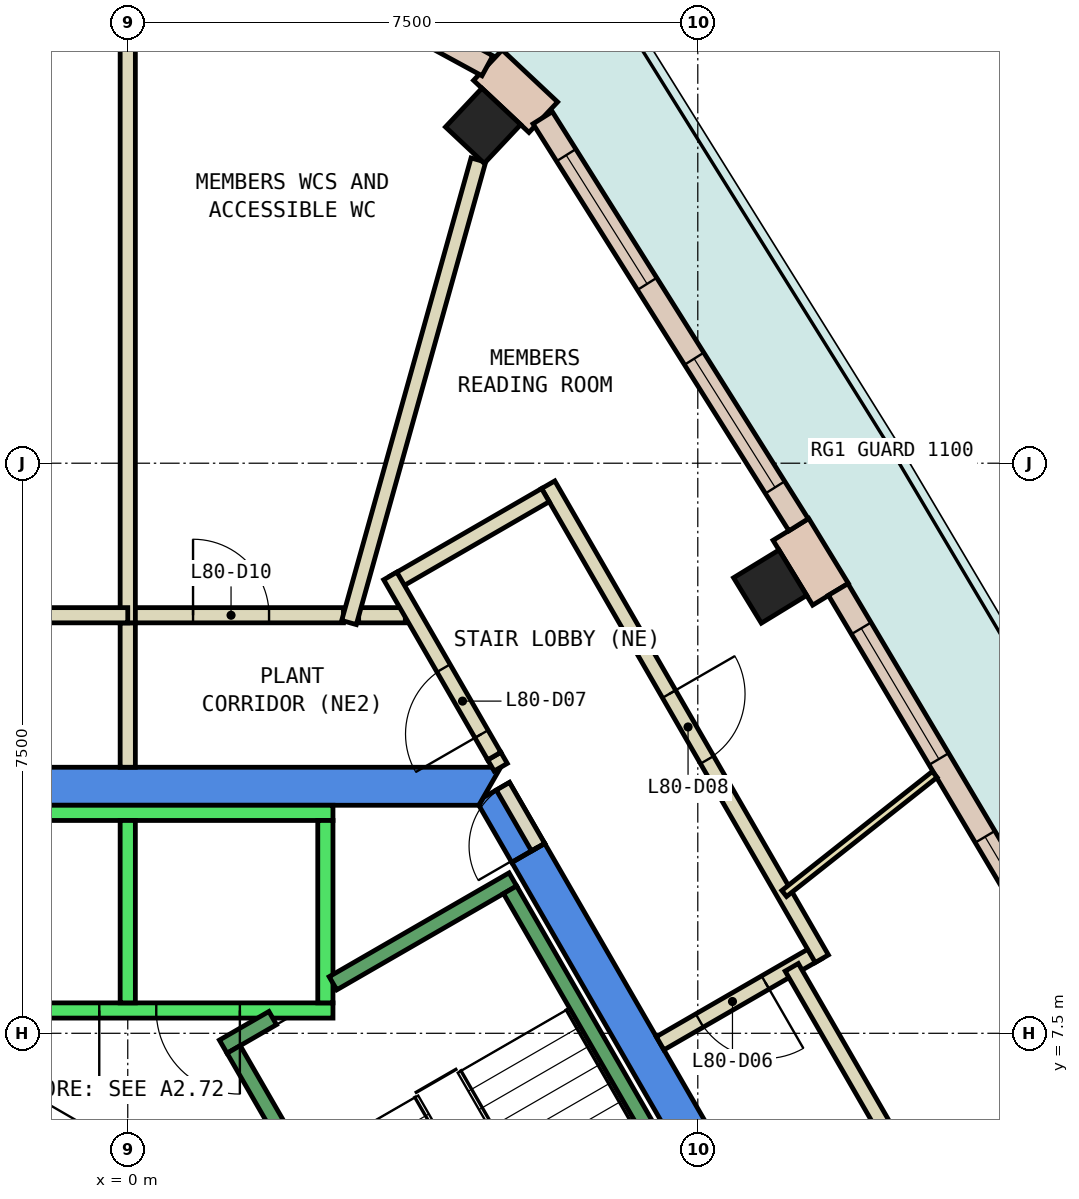
"""IFC4 building model, lengths in metres.
Left out: names, types, materials, properties, quantities, classifications, styles, units other than length and angle.
Written with IfcOpenShell. Run it as: python <this file> out.ifc"""

import sys

from ifc_helpers import new_model, si_unit, direction, frame, frame_2d, origin, origin_2d, place, context, subcontext, project, spatial, polyline, rectangle, outline, extrude, element, fill, save


model = new_model("IFC4")
c1 = context("Model", 3, precision=1e-05, world=origin(), true_north=direction((0.0, 1.0)))
c2 = subcontext(c1, "Body", "Model", "MODEL_VIEW")
j1 = project(units=[si_unit("LENGTHUNIT", "METRE"), si_unit("PLANEANGLEUNIT", "RADIAN")], contexts=[c1])
p1 = place(None, origin())
s1 = spatial("IfcSite", under=j1, at=p1, CompositionType="ELEMENT")
p2 = place(p1, origin())
s2 = spatial("IfcBuilding", under=s1, at=p2, CompositionType="ELEMENT")
p3 = place(p2, frame((0.0, 0.0, 340.4)))
s3 = spatial("IfcBuildingStorey", under=s2, at=p3, CompositionType="ELEMENT", Elevation=340.4)
for number, where, z_axis, x_axis in (
    (1, (8.452, 13.377, 0.0), (0.0, 0.0, 1.0), (-0.522, 0.853, 0.0)),
    (2, (4.675, 19.439, 0.0), (0.0, 0.0, 1.0), (-0.729, 0.685, 0.0)),
):
    element("IfcColumn", number, at=place(p3, frame(where, z_axis=z_axis, x_axis=x_axis)), inside=s3, PredefinedType="COLUMN", context=c2, shape_type="SweptSolid", body=[
        extrude(rectangle(XDim=0.7, YDim=0.7, at=origin_2d()), origin(), (0.0, 0.0, 1.0), 4.15),
    ])
p4 = place(p3, frame((0.0, 0.0, -0.45)))
e3 = element("IfcWall", 3, at=p4, inside=s3, PredefinedType="SHEAR", context=c2, shape_type="SweptSolid", body=[
    extrude(outline(polyline([(5.486, 9.998), (5.053, 9.748), (9.238, 2.5), (9.815, 2.5), (5.486, 9.998)])), origin(), (0.0, 0.0, 1.0), 4.6),
])
p5 = place(p3, frame((0.0, 0.0, 3.6)))
e4 = element("IfcWall", 4, at=p5, inside=s3, PredefinedType="SHEAR", context=c2, shape_type="SweptSolid", body=[
    extrude(outline(polyline([(5.022, 10.8), (4.677, 10.601), (4.619, 10.5), (5.053, 9.748), (5.486, 9.998), (5.022, 10.8)])), origin(), (0.0, 0.0, 1.0), 0.55),
])
p6 = place(p3, frame((0.0, 0.0, -0.45)))
e5 = element("IfcWall", 5, at=p6, inside=s3, PredefinedType="SHEAR", context=c2, shape_type="SweptSolid", body=[
    extrude(outline(polyline([(4.907, 11.0), (-4.907, 11.0), (-4.619, 10.5), (4.619, 10.5), (4.907, 11.0)])), origin(), (0.0, 0.0, 1.0), 4.6),
])
p7 = place(p3, frame((9.246, 13.276, 0.0), z_axis=(0.0, 0.0, 1.0), x_axis=(-0.521232636172, 0.853414634857, 0.0)))
e6 = element("IfcWall", 6, at=p7, inside=s3, PredefinedType="STANDARD", context=c2, shape_type="SweptSolid", body=[
    extrude(rectangle(XDim=1.0, YDim=0.55, at=frame_2d((0.5, 0.0))), origin(), (0.0, 0.0, 1.0), 4.15),
])
p8 = place(p3, frame((5.467, 19.552, 0.0), z_axis=(0.0, 0.0, 1.0), x_axis=(-0.728729965402, 0.684801166416, 0.0)))
e7 = element("IfcWall", 7, at=p8, inside=s3, PredefinedType="STANDARD", context=c2, shape_type="SweptSolid", body=[
    extrude(rectangle(XDim=1.0, YDim=0.55, at=frame_2d((0.5, 0.0))), origin(), (0.0, 0.0, 1.0), 4.15),
])
p9 = place(p3, frame((12.605, 7.854, 0.0), z_axis=(0.0, 0.0, 1.0), x_axis=(-0.510686403068, 0.859767060152, 0.0)))
e8 = element("IfcWall", 8, at=p9, inside=s3, PredefinedType="STANDARD", context=c2, shape_type="SweptSolid", body=[
    extrude(rectangle(XDim=6.38, YDim=0.3, at=frame_2d((3.19, 0.0))), origin(), (0.0, 0.0, 1.0), 4.15),
])
p10 = place(p9, frame((0.595, 0.0, 0.9)))
e9 = element("IfcOpeningElement", 9, at=p10, cuts=e8, PredefinedType="OPENING", context=c2, shape_type="SweptSolid", body=[
    extrude(rectangle(XDim=2.0, YDim=3.0, at=frame_2d((1.0, 1.5))), frame((0.0, 0.16, 0.0), z_axis=(0.0, -1.0, 0.0), x_axis=(1.0, 0.0, 0.0)), (0.0, 0.0, 1.0), 0.32),
])
p11 = place(p9, frame((3.785, 0.0, 0.9)))
e10 = element("IfcOpeningElement", 10, at=p11, cuts=e8, PredefinedType="OPENING", context=c2, shape_type="SweptSolid", body=[
    extrude(rectangle(XDim=2.0, YDim=3.0, at=frame_2d((1.0, 1.5))), frame((0.0, 0.16, 0.0), z_axis=(0.0, -1.0, 0.0), x_axis=(1.0, 0.0, 0.0)), (0.0, 0.0, 1.0), 0.32),
])
p12 = place(p3, frame((8.826, 14.19, 0.0), z_axis=(0.0, 0.0, 1.0), x_axis=(-0.532279831475, 0.846568473902, 0.0)))
e11 = element("IfcWall", 11, at=p12, inside=s3, PredefinedType="STANDARD", context=c2, shape_type="SweptSolid", body=[
    extrude(rectangle(XDim=6.325, YDim=0.3, at=frame_2d((3.163, 0.0))), origin(), (0.0, 0.0, 1.0), 4.15),
])
p13 = place(p12, frame((0.581, 0.0, 0.9)))
e12 = element("IfcOpeningElement", 12, at=p13, cuts=e11, PredefinedType="OPENING", context=c2, shape_type="SweptSolid", body=[
    extrude(rectangle(XDim=2.0, YDim=3.0, at=frame_2d((1.0, 1.5))), frame((0.0, 0.16, 0.0), z_axis=(0.0, -1.0, 0.0), x_axis=(1.0, 0.0, 0.0)), (0.0, 0.0, 1.0), 0.32),
])
p14 = place(p12, frame((3.744, 0.0, 0.9)))
e13 = element("IfcOpeningElement", 13, at=p14, cuts=e11, PredefinedType="OPENING", context=c2, shape_type="SweptSolid", body=[
    extrude(rectangle(XDim=2.0, YDim=3.0, at=frame_2d((1.0, 1.5))), frame((0.0, 0.16, 0.0), z_axis=(0.0, -1.0, 0.0), x_axis=(1.0, 0.0, 0.0)), (0.0, 0.0, 1.0), 0.32),
])
p15 = place(p3, frame((4.732, 20.229, 0.0), z_axis=(0.0, 0.0, 1.0), x_axis=(-0.8782630237, 0.478177855197, 0.0)))
e14 = element("IfcWall", 14, at=p15, inside=s3, PredefinedType="STANDARD", context=c2, shape_type="SweptSolid", body=[
    extrude(rectangle(XDim=4.364, YDim=0.3, at=frame_2d((2.182, 0.0))), origin(), (0.0, 0.0, 1.0), 4.15),
])
p16 = place(p15, frame((1.482, 0.0, 0.9)))
e15 = element("IfcOpeningElement", 15, at=p16, cuts=e14, PredefinedType="OPENING", context=c2, shape_type="SweptSolid", body=[
    extrude(rectangle(XDim=1.4, YDim=3.0, at=frame_2d((0.7, 1.5))), frame((0.0, 0.16, 0.0), z_axis=(0.0, -1.0, 0.0), x_axis=(1.0, 0.0, 0.0)), (0.0, 0.0, 1.0), 0.32),
])
p17 = place(p3, frame((-0.899, 22.316, 0.0), z_axis=(0.0, 0.0, 1.0), x_axis=(-0.8782630237, -0.478177855197, 0.0)))
e16 = element("IfcWall", 16, at=p17, inside=s3, PredefinedType="STANDARD", context=c2, shape_type="SweptSolid", body=[
    extrude(rectangle(XDim=4.364, YDim=0.3, at=frame_2d((2.182, 0.0))), origin(), (0.0, 0.0, 1.0), 4.15),
])
p18 = place(p17, frame((1.482, 0.0, 0.9)))
e17 = element("IfcOpeningElement", 17, at=p18, cuts=e16, PredefinedType="OPENING", context=c2, shape_type="SweptSolid", body=[
    extrude(rectangle(XDim=1.4, YDim=3.0, at=frame_2d((0.7, 1.5))), frame((0.0, 0.16, 0.0), z_axis=(0.0, -1.0, 0.0), x_axis=(1.0, 0.0, 0.0)), (0.0, 0.0, 1.0), 0.32),
])
p19 = place(p3, frame((9.082, 8.568, 0.0), z_axis=(0.0, 0.0, 1.0), x_axis=(-0.865955154139, -0.50012165622, 0.0)))
e18 = element("IfcWall", 18, at=p19, inside=s3, PredefinedType="PARTITIONING", context=c2, shape_type="SweptSolid", body=[
    extrude(rectangle(XDim=2.4, YDim=0.2, at=frame_2d((1.2, 0.0))), origin(), (0.0, 0.0, 1.0), 4.15),
])
p20 = place(p19, frame((0.8, 0.0, 0.0)))
e19 = element("IfcOpeningElement", 19, at=p20, cuts=e18, PredefinedType="OPENING", context=c2, shape_type="SweptSolid", body=[
    extrude(rectangle(XDim=1.0, YDim=2.1, at=frame_2d((0.5, 1.05))), frame((0.0, 0.11, 0.0), z_axis=(0.0, -1.0, 0.0), x_axis=(1.0, 0.0, 0.0)), (0.0, 0.0, 1.0), 0.22),
])
p21 = place(p3, frame((4.907, 11.0, 0.0), z_axis=(0.0, 0.0, 1.0), x_axis=(-0.5004692653, 0.865754303766, 0.0)))
e20 = element("IfcWall", 20, at=p21, inside=s3, PredefinedType="PARTITIONING", context=c2, shape_type="SweptSolid", body=[
    extrude(rectangle(XDim=0.17, YDim=0.2, at=frame_2d((0.085, 0.0))), origin(), (0.0, 0.0, 1.0), 2.4),
])
p22 = place(p3, frame((5.532, 14.717, 0.0), z_axis=(0.0, 0.0, 1.0), x_axis=(0.499968011863, -0.866043871356, 0.0)))
e21 = element("IfcWall", 21, at=p22, inside=s3, PredefinedType="PARTITIONING", context=c2, shape_type="SweptSolid", body=[
    extrude(rectangle(XDim=7.201, YDim=0.2, at=frame_2d((3.6, 0.0))), origin(), (0.0, 0.0, 1.0), 4.15),
])
p23 = place(p22, frame((3.18, 0.0, 0.0)))
e22 = element("IfcOpeningElement", 22, at=p23, cuts=e21, PredefinedType="OPENING", context=c2, shape_type="SweptSolid", body=[
    extrude(rectangle(XDim=1.0, YDim=2.1, at=frame_2d((0.5, 1.05))), frame((0.0, 0.11, 0.0), z_axis=(0.0, -1.0, 0.0), x_axis=(1.0, 0.0, 0.0)), (0.0, 0.0, 1.0), 0.22),
])
p24 = place(p3, frame((3.504, 13.43, 0.0), z_axis=(0.0, 0.0, 1.0), x_axis=(0.865927408828, 0.500169693844, 0.0)))
e23 = element("IfcWall", 23, at=p24, inside=s3, PredefinedType="PARTITIONING", context=c2, shape_type="SweptSolid", body=[
    extrude(rectangle(XDim=2.3, YDim=0.2, at=frame_2d((1.15, 0.0))), origin(), (0.0, 0.0, 1.0), 4.15),
])
p25 = place(p3, frame((8.736, 8.368, 0.0), z_axis=(0.0, 0.0, 1.0), x_axis=(0.499995994493, -0.866027716353, 0.0)))
e24 = element("IfcWall", 24, at=p25, inside=s3, PredefinedType="PARTITIONING", context=c2, shape_type="SweptSolid", body=[
    extrude(rectangle(XDim=6.876, YDim=0.2, at=frame_2d((3.438, 0.0))), origin(), (0.0, 0.0, 1.0), 4.15),
])
p26 = place(p25, frame((5.726, 0.0, 0.0)))
e25 = element("IfcOpeningElement", 25, at=p26, cuts=e24, PredefinedType="OPENING", context=c2, shape_type="SweptSolid", body=[
    extrude(rectangle(XDim=1.0, YDim=2.1, at=frame_2d((0.5, 1.05))), frame((0.0, 0.11, 0.0), z_axis=(0.0, -1.0, 0.0), x_axis=(1.0, 0.0, 0.0)), (0.0, 0.0, 1.0), 0.22),
])
p27 = place(p3, frame((3.038, 13.0, 0.0), z_axis=(0.0, 0.0, 1.0), x_axis=(1.0, 0.0, 0.0)))
e26 = element("IfcWall", 26, at=p27, inside=s3, PredefinedType="PARTITIONING", context=c2, shape_type="SweptSolid", body=[
    extrude(rectangle(XDim=0.614, YDim=0.2, at=frame_2d((0.307, 0.0))), origin(), (0.0, 0.0, 1.0), 4.15),
])
p28 = place(p3, frame((0.0, 13.0, 0.0), z_axis=(0.0, 0.0, 1.0), x_axis=(1.0, 0.0, 0.0)))
e27 = element("IfcWall", 27, at=p28, inside=s3, PredefinedType="PARTITIONING", context=c2, shape_type="SweptSolid", body=[
    extrude(rectangle(XDim=2.838, YDim=0.2, at=frame_2d((1.419, 0.0))), origin(), (0.0, 0.0, 1.0), 4.15),
])
p29 = place(p28, frame((0.859, 0.0, 0.0)))
e28 = element("IfcOpeningElement", 28, at=p29, cuts=e27, PredefinedType="OPENING", context=c2, shape_type="SweptSolid", body=[
    extrude(rectangle(XDim=1.0, YDim=2.1, at=frame_2d((0.5, 1.05))), frame((0.0, 0.11, 0.0), z_axis=(0.0, -1.0, 0.0), x_axis=(1.0, 0.0, 0.0)), (0.0, 0.0, 1.0), 0.22),
])
p30 = place(p3, frame((0.0, 11.0, 0.0), z_axis=(0.0, 0.0, 1.0), x_axis=(0.0, 1.0, 0.0)))
e29 = element("IfcWall", 29, at=p30, inside=s3, PredefinedType="PARTITIONING", context=c2, shape_type="SweptSolid", body=[
    extrude(rectangle(XDim=1.9, YDim=0.2, at=frame_2d((0.95, 0.0))), origin(), (0.0, 0.0, 1.0), 4.15),
])
p31 = place(p3, frame((10.617, 10.906, 0.0), z_axis=(0.0, 0.0, 1.0), x_axis=(-0.784159528351, -0.620559291363, 0.0)))
e30 = element("IfcWall", 30, at=p31, inside=s3, PredefinedType="PARTITIONING", context=c2, shape_type="SweptSolid", body=[
    extrude(rectangle(XDim=2.525, YDim=0.1, at=frame_2d((1.262, 0.0))), origin(), (0.0, 0.0, 1.0), 4.15),
])
p32 = place(p3, frame((2.911, 12.904, 0.0), z_axis=(0.0, 0.0, 1.0), x_axis=(0.269389141698, 0.963031406723, 0.0)))
e31 = element("IfcWall", 31, at=p32, inside=s3, PredefinedType="PARTITIONING", context=c2, shape_type="SweptSolid", body=[
    extrude(rectangle(XDim=6.319, YDim=0.2, at=frame_2d((3.159, 0.0))), origin(), (0.0, 0.0, 1.0), 4.15),
])
p33 = place(p3, frame((0.0, 12.9, 0.0), z_axis=(0.0, 0.0, 1.0), x_axis=(0.0, 1.0, 0.0)))
e32 = element("IfcWall", 32, at=p33, inside=s3, PredefinedType="PARTITIONING", context=c2, shape_type="SweptSolid", body=[
    extrude(rectangle(XDim=7.756, YDim=0.2, at=frame_2d((3.878, 0.0))), origin(), (0.0, 0.0, 1.0), 4.15),
])
p34 = place(p3, frame((-5.962, 13.0, 0.0), z_axis=(0.0, 0.0, 1.0), x_axis=(1.0, 0.0, 0.0)))
e33 = element("IfcWall", 33, at=p34, inside=s3, PredefinedType="PARTITIONING", context=c2, shape_type="SweptSolid", body=[
    extrude(rectangle(XDim=5.962, YDim=0.2, at=frame_2d((2.981, 0.0))), origin(), (0.0, 0.0, 1.0), 4.15),
])
p35 = place(p3, frame((5.399, 9.948, 0.0), z_axis=(0.0, 0.0, 1.0), x_axis=(-0.499882215713, 0.866093395895, 0.0)))
e34 = element("IfcWall", 34, at=p35, inside=s3, PredefinedType="PARTITIONING", context=c2, shape_type="SweptSolid", body=[
    extrude(rectangle(XDim=0.926, YDim=0.2, at=frame_2d((0.463, 0.0))), origin(), (0.0, 0.0, 1.0), 2.4),
])
p36 = place(p35, frame((0.017, 0.0, 0.0)))
e35 = element("IfcOpeningElement", 35, at=p36, cuts=e34, PredefinedType="OPENING", context=c2, shape_type="SweptSolid", body=[
    extrude(rectangle(XDim=0.9, YDim=2.1, at=frame_2d((0.45, 1.05))), frame((0.0, 0.11, 0.0), z_axis=(0.0, -1.0, 0.0), x_axis=(1.0, 0.0, 0.0)), (0.0, 0.0, 1.0), 0.22),
])
p37 = place(p3, frame((4.822, 11.147, 0.0), z_axis=(0.0, 0.0, 1.0), x_axis=(-0.499871764879, 0.866099427708, 0.0)))
e36 = element("IfcWall", 36, at=p37, inside=s3, PredefinedType="PARTITIONING", context=c2, shape_type="SweptSolid", body=[
    extrude(rectangle(XDim=2.737, YDim=0.2, at=frame_2d((1.368, 0.0))), origin(), (0.0, 0.0, 1.0), 4.15),
])
p38 = place(p37, frame((0.335, 0.0, 0.0)))
e37 = element("IfcOpeningElement", 37, at=p38, cuts=e36, PredefinedType="OPENING", context=c2, shape_type="SweptSolid", body=[
    extrude(rectangle(XDim=1.0, YDim=2.1, at=frame_2d((0.5, 1.05))), frame((0.0, 0.11, 0.0), z_axis=(0.0, -1.0, 0.0), x_axis=(1.0, 0.0, 0.0)), (0.0, 0.0, 1.0), 0.22),
])
p39 = place(p3, frame((2.7, 7.8, 0.0), z_axis=(0.0, 0.0, 1.0), x_axis=(-1.0, 0.0, 0.0)))
e38 = element("IfcWall", 38, at=p39, inside=s3, PredefinedType="STANDARD", context=c2, shape_type="SweptSolid", body=[
    extrude(rectangle(XDim=5.4, YDim=0.2, at=frame_2d((2.7, 0.0))), origin(), (0.0, 0.0, 1.0), 4.15),
])
p40 = place(p39, frame((1.225, 0.0, 0.0)))
e39 = element("IfcOpeningElement", 39, at=p40, cuts=e38, PredefinedType="OPENING", context=c2, shape_type="SweptSolid", body=[
    extrude(rectangle(XDim=1.1, YDim=2.1, at=frame_2d((0.55, 1.05))), frame((0.0, 0.11, 0.0), z_axis=(0.0, -1.0, 0.0), x_axis=(1.0, 0.0, 0.0)), (0.0, 0.0, 1.0), 0.22),
])
p41 = place(p39, frame((3.075, 0.0, 0.0)))
e40 = element("IfcOpeningElement", 40, at=p41, cuts=e38, PredefinedType="OPENING", context=c2, shape_type="SweptSolid", body=[
    extrude(rectangle(XDim=1.1, YDim=2.1, at=frame_2d((0.55, 1.05))), frame((0.0, 0.11, 0.0), z_axis=(0.0, -1.0, 0.0), x_axis=(1.0, 0.0, 0.0)), (0.0, 0.0, 1.0), 0.22),
])
p42 = place(p3, frame((2.7, 10.4, 0.0), z_axis=(0.0, 0.0, 1.0), x_axis=(-1.0, 0.0, 0.0)))
e41 = element("IfcWall", 41, at=p42, inside=s3, PredefinedType="STANDARD", context=c2, shape_type="SweptSolid", body=[
    extrude(rectangle(XDim=5.4, YDim=0.2, at=frame_2d((2.7, 0.0))), origin(), (0.0, 0.0, 1.0), 4.15),
])
for number, where, z_axis, x_axis in (
    (42, (2.6, 7.9, 0.0), (0.0, 0.0, 1.0), (0.0, 1.0, 0.0)),
    (43, (0.0, 7.9, 0.0), (0.0, 0.0, 1.0), (0.0, 1.0, 0.0)),
):
    element("IfcWall", number, at=place(p3, frame(where, z_axis=z_axis, x_axis=x_axis)), inside=s3, PredefinedType="STANDARD", context=c2, shape_type="SweptSolid", body=[
        extrude(rectangle(XDim=2.4, YDim=0.2, at=frame_2d((1.2, 0.0))), origin(), (0.0, 0.0, 1.0), 4.15),
    ])
p43 = place(p3, frame((2.7, 8.158, 0.0), z_axis=(0.0, 0.0, 1.0), x_axis=(0.86611865017, 0.499838457731, 0.0)))
e44 = element("IfcWall", 44, at=p43, inside=s3, PredefinedType="STANDARD", context=c2, shape_type="SweptSolid", body=[
    extrude(rectangle(XDim=2.733, YDim=0.2, at=frame_2d((1.366, 0.0))), origin(), (0.0, 0.0, 1.0), 4.15),
])
p44 = place(p3, frame((1.256, 7.324, 0.0), z_axis=(0.0, 0.0, 1.0), x_axis=(0.865915093549, 0.500191014278, 0.0)))
e45 = element("IfcWall", 45, at=p44, inside=s3, PredefinedType="STANDARD", context=c2, shape_type="SweptSolid", body=[
    extrude(rectangle(XDim=0.752, YDim=0.2, at=frame_2d((0.376, 0.0))), origin(), (0.0, 0.0, 1.0), 4.15),
])
p45 = place(p3, frame((4.843, 1.312, 0.0), z_axis=(0.0, 0.0, 1.0), x_axis=(-0.499963383562, 0.866046543262, 0.0)))
e46 = element("IfcWall", 46, at=p45, inside=s3, PredefinedType="STANDARD", context=c2, shape_type="SweptSolid", body=[
    extrude(rectangle(XDim=6.9, YDim=0.2, at=frame_2d((3.45, 0.0))), origin(), (0.0, 0.0, 1.0), 4.15),
])
p46 = place(p45, frame((0.45, 0.0, 0.0)))
e47 = element("IfcOpeningElement", 47, at=p46, cuts=e46, PredefinedType="OPENING", context=c2, shape_type="SweptSolid", body=[
    extrude(rectangle(XDim=1.1, YDim=2.2, at=frame_2d((0.55, 1.1))), frame((0.0, 0.11, 0.0), z_axis=(0.0, -1.0, 0.0), x_axis=(1.0, 0.0, 0.0)), (0.0, 0.0, 1.0), 0.22),
])
p47 = place(p3, frame((8.48, 3.412, 0.0), z_axis=(0.0, 0.0, 1.0), x_axis=(-0.499978703459, 0.866037698999, 0.0)))
e48 = element("IfcWall", 48, at=p47, inside=s3, PredefinedType="STANDARD", context=c2, shape_type="SweptSolid", body=[
    extrude(rectangle(XDim=6.9, YDim=0.2, at=frame_2d((3.45, 0.0))), origin(), (0.0, 0.0, 1.0), 4.15),
])
p48 = place(p10, origin())
e49 = element("IfcWindow", 49, at=p48, inside=s3, PartitioningType="SINGLE_PANEL", PredefinedType="WINDOW", context=c2, shape_type="SweptSolid", body=[
    extrude(rectangle(XDim=2.0, YDim=3.0, at=frame_2d((1.0, 1.5))), frame((0.0, 0.03, 0.0), z_axis=(0.0, -1.0, 0.0), x_axis=(1.0, 0.0, 0.0)), (0.0, 0.0, 1.0), 0.06),
])
fill(e9, e49)
p49 = place(p11, origin())
e50 = element("IfcWindow", 50, at=p49, inside=s3, PartitioningType="SINGLE_PANEL", PredefinedType="WINDOW", context=c2, shape_type="SweptSolid", body=[
    extrude(rectangle(XDim=2.0, YDim=3.0, at=frame_2d((1.0, 1.5))), frame((0.0, 0.03, 0.0), z_axis=(0.0, -1.0, 0.0), x_axis=(1.0, 0.0, 0.0)), (0.0, 0.0, 1.0), 0.06),
])
fill(e10, e50)
p50 = place(p13, origin())
e51 = element("IfcWindow", 51, at=p50, inside=s3, PartitioningType="SINGLE_PANEL", PredefinedType="WINDOW", context=c2, shape_type="SweptSolid", body=[
    extrude(rectangle(XDim=2.0, YDim=3.0, at=frame_2d((1.0, 1.5))), frame((0.0, 0.03, 0.0), z_axis=(0.0, -1.0, 0.0), x_axis=(1.0, 0.0, 0.0)), (0.0, 0.0, 1.0), 0.06),
])
fill(e12, e51)
p51 = place(p14, origin())
e52 = element("IfcWindow", 52, at=p51, inside=s3, PartitioningType="SINGLE_PANEL", PredefinedType="WINDOW", context=c2, shape_type="SweptSolid", body=[
    extrude(rectangle(XDim=2.0, YDim=3.0, at=frame_2d((1.0, 1.5))), frame((0.0, 0.03, 0.0), z_axis=(0.0, -1.0, 0.0), x_axis=(1.0, 0.0, 0.0)), (0.0, 0.0, 1.0), 0.06),
])
fill(e13, e52)
p52 = place(p20, origin())
e53 = element("IfcDoor", 53, at=p52, inside=s3, OperationType="SINGLE_SWING_LEFT", PredefinedType="DOOR", context=c2, shape_type="SweptSolid", body=[
    extrude(rectangle(XDim=1.0, YDim=2.1, at=frame_2d((0.5, 1.05))), frame((0.0, 0.025, 0.0), z_axis=(0.0, -1.0, 0.0), x_axis=(1.0, 0.0, 0.0)), (0.0, 0.0, 1.0), 0.05),
])
fill(e19, e53)
p53 = place(p38, origin())
e54 = element("IfcDoor", 54, at=p53, inside=s3, OperationType="SINGLE_SWING_RIGHT", PredefinedType="DOOR", context=c2, shape_type="SweptSolid", body=[
    extrude(rectangle(XDim=1.0, YDim=2.1, at=frame_2d((0.5, 1.05))), frame((0.0, 0.025, 0.0), z_axis=(0.0, -1.0, 0.0), x_axis=(1.0, 0.0, 0.0)), (0.0, 0.0, 1.0), 0.05),
])
fill(e37, e54)
p54 = place(p23, origin())
e55 = element("IfcDoor", 55, at=p54, inside=s3, OperationType="SINGLE_SWING_LEFT", PredefinedType="DOOR", context=c2, shape_type="SweptSolid", body=[
    extrude(rectangle(XDim=1.0, YDim=2.1, at=frame_2d((0.5, 1.05))), frame((0.0, 0.025, 0.0), z_axis=(0.0, -1.0, 0.0), x_axis=(1.0, 0.0, 0.0)), (0.0, 0.0, 1.0), 0.05),
])
fill(e22, e55)
p55 = place(p29, origin())
e56 = element("IfcDoor", 56, at=p55, inside=s3, OperationType="SINGLE_SWING_LEFT", PredefinedType="DOOR", context=c2, shape_type="SweptSolid", body=[
    extrude(rectangle(XDim=1.0, YDim=2.1, at=frame_2d((0.5, 1.05))), frame((0.0, 0.025, 0.0), z_axis=(0.0, -1.0, 0.0), x_axis=(1.0, 0.0, 0.0)), (0.0, 0.0, 1.0), 0.05),
])
fill(e28, e56)
p56 = place(p36, origin())
e57 = element("IfcDoor", 57, at=p56, inside=s3, OperationType="SINGLE_SWING_LEFT", PredefinedType="DOOR", context=c2, shape_type="SweptSolid", body=[
    extrude(rectangle(XDim=0.9, YDim=2.1, at=frame_2d((0.45, 1.05))), frame((0.0, 0.025, 0.0), z_axis=(0.0, -1.0, 0.0), x_axis=(1.0, 0.0, 0.0)), (0.0, 0.0, 1.0), 0.05),
])
fill(e35, e57)
p57 = place(p40, origin())
e58 = element("IfcDoor", 58, at=p57, inside=s3, OperationType="SLIDING_TO_LEFT", PredefinedType="DOOR", context=c2, shape_type="SweptSolid", body=[
    extrude(rectangle(XDim=1.1, YDim=2.1, at=frame_2d((0.55, 1.05))), frame((0.0, 0.025, 0.0), z_axis=(0.0, -1.0, 0.0), x_axis=(1.0, 0.0, 0.0)), (0.0, 0.0, 1.0), 0.05),
])
fill(e39, e58)
p58 = place(p41, origin())
e59 = element("IfcDoor", 59, at=p58, inside=s3, OperationType="SLIDING_TO_LEFT", PredefinedType="DOOR", context=c2, shape_type="SweptSolid", body=[
    extrude(rectangle(XDim=1.1, YDim=2.1, at=frame_2d((0.55, 1.05))), frame((0.0, 0.025, 0.0), z_axis=(0.0, -1.0, 0.0), x_axis=(1.0, 0.0, 0.0)), (0.0, 0.0, 1.0), 0.05),
])
fill(e40, e59)
save(model, sys.argv[1])
